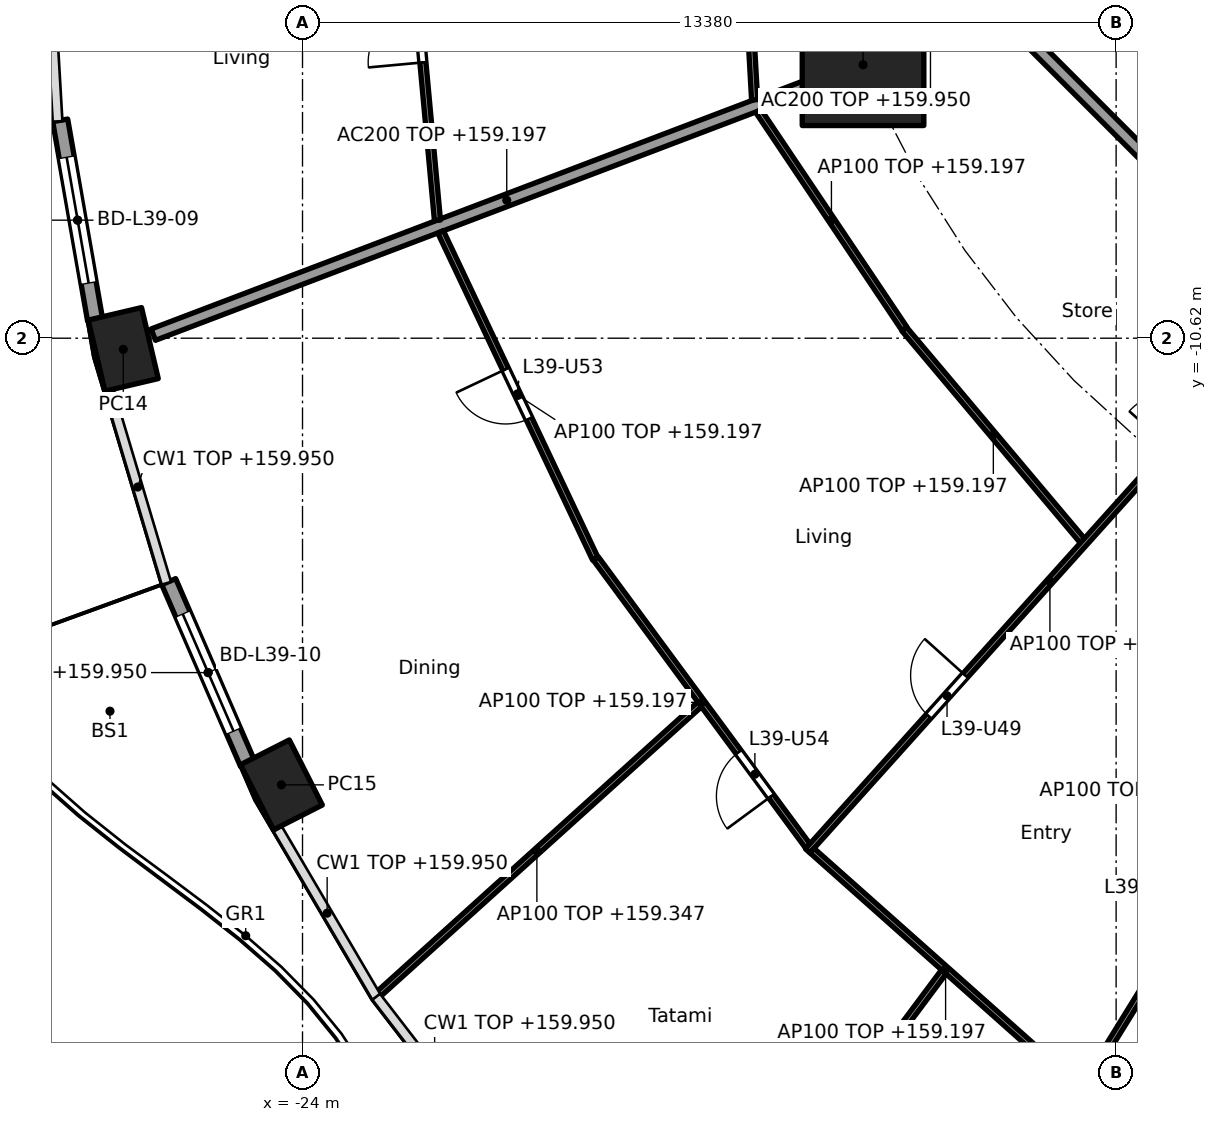
"""IFC4 building model, lengths in metres.
Left out: names, types, materials, properties, quantities, classifications, styles, units other than length and angle.
Written with IfcOpenShell. Run it as: python <this file> out.ifc"""

import sys

from ifc_helpers import new_model, si_unit, direction, frame, frame_2d, origin, origin_2d, place, context, subcontext, project, spatial, rectangle, hollow_rectangle, extrude, element, fill, save


model = new_model("IFC4")
c1 = context("Model", 3, precision=1e-05, world=origin(), true_north=direction((0.0, 1.0)))
c2 = subcontext(c1, "Body", "Model", "MODEL_VIEW")
j1 = project(units=[si_unit("LENGTHUNIT", "METRE"), si_unit("PLANEANGLEUNIT", "RADIAN")], contexts=[c1])
p1 = place(None, origin())
s1 = spatial("IfcSite", under=j1, at=p1, CompositionType="ELEMENT")
p2 = place(p1, origin())
s2 = spatial("IfcBuilding", under=s1, at=p2, CompositionType="ELEMENT")
p3 = place(p2, frame((0.0, 0.0, 156.6)))
s3 = spatial("IfcBuildingStorey", under=s2, at=p3, CompositionType="ELEMENT", Elevation=156.6)
for number, where, z_axis, x_axis in (
    (1, (-26.948, -10.803, 0.0), (0.0, 0.0, 1.0), (0.229, -0.973, 0.0)),
    (2, (-24.347, -17.965, 0.0), (0.0, 0.0, 1.0), (0.452, -0.892, 0.0)),
):
    element("IfcColumn", number, at=place(p3, frame(where, z_axis=z_axis, x_axis=x_axis)), inside=s3, PredefinedType="COLUMN", context=c2, shape_type="SweptSolid", body=[
        extrude(hollow_rectangle(XDim=1.2, YDim=0.9, WallThickness=0.04, at=origin_2d()), origin(), (0.0, 0.0, 1.0), 3.7),
    ])
p4 = place(p3, frame((-14.782, -6.123, 0.0), z_axis=(0.0, 0.0, 1.0), x_axis=(1.0, 0.0, 0.0)))
e3 = element("IfcColumn", 3, at=p4, inside=s3, PredefinedType="COLUMN", context=c2, shape_type="SweptSolid", body=[
    extrude(rectangle(XDim=2.0, YDim=2.0, at=origin_2d()), origin(), (0.0, 0.0, 1.0), 3.7),
])
p5 = place(p3, frame((-27.411, -10.32, 0.0), z_axis=(0.0, 0.0, 1.0), x_axis=(-0.172163521006, 0.985068384446, 0.0)))
e4 = element("IfcWall", 4, at=p5, inside=s3, PredefinedType="SOLIDWALL", context=c2, shape_type="SweptSolid", body=[
    extrude(rectangle(XDim=3.333, YDim=0.25, at=frame_2d((1.666, 0.0))), origin(), (0.0, 0.0, 1.0), 3.35),
])
p6 = place(p5, frame((0.616, 0.0, 0.0)))
e5 = element("IfcOpeningElement", 5, at=p6, cuts=e4, PredefinedType="OPENING", context=c2, shape_type="SweptSolid", body=[
    extrude(rectangle(XDim=2.1, YDim=2.4, at=frame_2d((1.05, 1.2))), frame((0.0, 0.135, 0.0), z_axis=(0.0, -1.0, 0.0), x_axis=(1.0, 0.0, 0.0)), (0.0, 0.0, 1.0), 0.27),
])
p7 = place(p3, frame((-24.904, -17.615, 0.0), z_axis=(0.0, 0.0, 1.0), x_axis=(-0.397638954585, 0.917541967321, 0.0)))
e6 = element("IfcWall", 6, at=p7, inside=s3, PredefinedType="SOLIDWALL", context=c2, shape_type="SweptSolid", body=[
    extrude(rectangle(XDim=3.261, YDim=0.25, at=frame_2d((1.63, 0.0))), origin(), (0.0, 0.0, 1.0), 3.35),
])
p8 = place(p7, frame((0.58, 0.0, 0.0)))
e7 = element("IfcOpeningElement", 7, at=p8, cuts=e6, PredefinedType="OPENING", context=c2, shape_type="SweptSolid", body=[
    extrude(rectangle(XDim=2.1, YDim=2.4, at=frame_2d((1.05, 1.2))), frame((0.0, 0.135, 0.0), z_axis=(0.0, -1.0, 0.0), x_axis=(1.0, 0.0, 0.0)), (0.0, 0.0, 1.0), 0.27),
])
p9 = place(p3, frame((-12.657, -5.243, 0.0), z_axis=(0.0, 0.0, 1.0), x_axis=(-0.923859888513, -0.38273085373, 0.0)))
e8 = element("IfcWall", 8, at=p9, inside=s3, PredefinedType="PARTITIONING", context=c2, shape_type="SweptSolid", body=[
    extrude(rectangle(XDim=2.199, YDim=0.2, at=frame_2d((1.1, 0.0))), origin(), (0.0, 0.0, 1.0), 3.35),
])
p10 = place(p3, frame((-14.829, -6.141, 0.0), z_axis=(0.0, 0.0, 1.0), x_axis=(-0.93470181966, -0.355432846433, 0.0)))
e9 = element("IfcWall", 9, at=p10, inside=s3, PredefinedType="PARTITIONING", context=c2, shape_type="SweptSolid", body=[
    extrude(rectangle(XDim=12.438, YDim=0.2, at=frame_2d((6.219, 0.0))), origin(), (0.0, 0.0, 1.0), 2.597),
])
p11 = place(p3, frame((-12.635, -5.134, 0.0), z_axis=(0.0, 0.0, 1.0), x_axis=(0.707106781187, -0.707106781187, 0.0)))
e10 = element("IfcWall", 10, at=p11, inside=s3, PredefinedType="PARTITIONING", context=c2, shape_type="SweptSolid", body=[
    extrude(rectangle(XDim=10.609, YDim=0.2, at=frame_2d((5.305, 0.0))), origin(), (0.0, 0.0, 1.0), 3.35),
])
p12 = place(p11, frame((8.274, 0.0, 0.0)))
e11 = element("IfcOpeningElement", 11, at=p12, cuts=e10, PredefinedType="OPENING", context=c2, shape_type="SweptSolid", body=[
    extrude(rectangle(XDim=1.0, YDim=2.1, at=frame_2d((0.5, 1.05))), frame((0.0, 0.11, 0.0), z_axis=(0.0, -1.0, 0.0), x_axis=(1.0, 0.0, 0.0)), (0.0, 0.0, 1.0), 0.22),
])
p13 = place(p3, frame((-16.825, -2.058, 0.0), z_axis=(0.0, 0.0, 1.0), x_axis=(0.055993664681, -0.998431124072, 0.0)))
e12 = element("IfcWall", 12, at=p13, inside=s3, PredefinedType="PARTITIONING", context=c2, shape_type="SweptSolid", body=[
    extrude(rectangle(XDim=4.648, YDim=0.1, at=frame_2d((2.324, 0.0))), origin(), (0.0, 0.0, 1.0), 2.597),
])
p14 = place(p13, frame((1.899, 0.0, 0.0)))
e13 = element("IfcOpeningElement", 13, at=p14, cuts=e12, PredefinedType="OPENING", context=c2, shape_type="SweptSolid", body=[
    extrude(rectangle(XDim=0.9, YDim=2.1, at=frame_2d((0.45, 1.05))), frame((0.0, 0.06, 0.0), z_axis=(0.0, -1.0, 0.0), x_axis=(1.0, 0.0, 0.0)), (0.0, 0.0, 1.0), 0.12),
])
p15 = place(p3, frame((-22.347, -2.542, 0.0), z_axis=(0.0, 0.0, 1.0), x_axis=(0.091796102484, -0.995777824401, 0.0)))
e14 = element("IfcWall", 14, at=p15, inside=s3, PredefinedType="PARTITIONING", context=c2, shape_type="SweptSolid", body=[
    extrude(rectangle(XDim=6.165, YDim=0.1, at=frame_2d((3.083, 0.0))), origin(), (0.0, 0.0, 1.0), 2.597),
])
p16 = place(p15, frame((2.657, 0.0, 0.0)))
e15 = element("IfcOpeningElement", 15, at=p16, cuts=e14, PredefinedType="OPENING", context=c2, shape_type="SweptSolid", body=[
    extrude(rectangle(XDim=0.9, YDim=2.1, at=frame_2d((0.45, 1.05))), frame((0.0, 0.06, 0.0), z_axis=(0.0, -1.0, 0.0), x_axis=(1.0, 0.0, 0.0)), (0.0, 0.0, 1.0), 0.12),
])
p17 = place(p3, frame((-16.504, -6.882, 0.0), z_axis=(0.0, 0.0, 1.0), x_axis=(0.556995256876, -0.830515673433, 0.0)))
e16 = element("IfcWall", 16, at=p17, inside=s3, PredefinedType="PARTITIONING", context=c2, shape_type="SweptSolid", body=[
    extrude(rectangle(XDim=4.317, YDim=0.1, at=frame_2d((2.158, 0.0))), origin(), (0.0, 0.0, 1.0), 2.597),
])
p18 = place(p3, frame((-21.729, -8.871, 0.0), z_axis=(0.0, 0.0, 1.0), x_axis=(0.427721126152, -0.903910746834, 0.0)))
e17 = element("IfcWall", 17, at=p18, inside=s3, PredefinedType="PARTITIONING", context=c2, shape_type="SweptSolid", body=[
    extrude(rectangle(XDim=5.949, YDim=0.1, at=frame_2d((2.974, 0.0))), origin(), (0.0, 0.0, 1.0), 2.597),
])
p19 = place(p18, frame((2.5, 0.0, 0.0)))
e18 = element("IfcOpeningElement", 18, at=p19, cuts=e17, PredefinedType="OPENING", context=c2, shape_type="SweptSolid", body=[
    extrude(rectangle(XDim=0.9, YDim=2.1, at=frame_2d((0.45, 1.05))), frame((0.0, 0.06, 0.0), z_axis=(0.0, -1.0, 0.0), x_axis=(1.0, 0.0, 0.0)), (0.0, 0.0, 1.0), 0.12),
])
p20 = place(p3, frame((-14.104, -10.47, 0.0), z_axis=(0.0, 0.0, 1.0), x_axis=(0.644051444483, -0.764982180746, 0.0)))
e19 = element("IfcWall", 19, at=p20, inside=s3, PredefinedType="PARTITIONING", context=c2, shape_type="SweptSolid", body=[
    extrude(rectangle(XDim=4.548, YDim=0.1, at=frame_2d((2.274, 0.0))), origin(), (0.0, 0.0, 1.0), 2.597),
])
p21 = place(p3, frame((-19.176, -14.244, 0.0), z_axis=(0.0, 0.0, 1.0), x_axis=(0.593532053206, -0.80481035146, 0.0)))
e20 = element("IfcWall", 20, at=p21, inside=s3, PredefinedType="PARTITIONING", context=c2, shape_type="SweptSolid", body=[
    extrude(rectangle(XDim=5.876, YDim=0.1, at=frame_2d((2.938, 0.0))), origin(), (0.0, 0.0, 1.0), 2.597),
])
p22 = place(p21, frame((3.957, 0.0, 0.0)))
e21 = element("IfcOpeningElement", 21, at=p22, cuts=e20, PredefinedType="OPENING", context=c2, shape_type="SweptSolid", body=[
    extrude(rectangle(XDim=0.9, YDim=2.1, at=frame_2d((0.45, 1.05))), frame((0.0, 0.06, 0.0), z_axis=(0.0, -1.0, 0.0), x_axis=(1.0, 0.0, 0.0)), (0.0, 0.0, 1.0), 0.12),
])
p23 = place(p3, frame((-17.47, -16.642, 0.0), z_axis=(0.0, 0.0, 1.0), x_axis=(-0.742345465337, -0.670017320742, 0.0)))
e22 = element("IfcWall", 22, at=p23, inside=s3, PredefinedType="PARTITIONING", context=c2, shape_type="SweptSolid", body=[
    extrude(rectangle(XDim=7.21, YDim=0.1, at=frame_2d((3.605, 0.0))), origin(), (0.0, 0.0, 1.0), 2.747),
])
p24 = place(p3, frame((-7.725, -10.186, 0.0), z_axis=(0.0, 0.0, 1.0), x_axis=(-0.668498346565, -0.743713628112, 0.0)))
e23 = element("IfcWall", 23, at=p24, inside=s3, PredefinedType="PARTITIONING", context=c2, shape_type="SweptSolid", body=[
    extrude(rectangle(XDim=11.919, YDim=0.1, at=frame_2d((5.959, 0.0))), origin(), (0.0, 0.0, 1.0), 2.515),
])
p25 = place(p24, frame((2.106, 0.0, 0.0)))
e24 = element("IfcOpeningElement", 24, at=p25, cuts=e23, PredefinedType="OPENING", context=c2, shape_type="SweptSolid", body=[
    extrude(rectangle(XDim=0.9, YDim=2.1, at=frame_2d((0.45, 1.05))), frame((0.0, 0.06, 0.0), z_axis=(0.0, -1.0, 0.0), x_axis=(1.0, 0.0, 0.0)), (0.0, 0.0, 1.0), 0.12),
])
p26 = place(p24, frame((8.041, 0.0, 0.0)))
e25 = element("IfcOpeningElement", 25, at=p26, cuts=e23, PredefinedType="OPENING", context=c2, shape_type="SweptSolid", body=[
    extrude(rectangle(XDim=0.9, YDim=2.1, at=frame_2d((0.45, 1.05))), frame((0.0, 0.06, 0.0), z_axis=(0.0, -1.0, 0.0), x_axis=(1.0, 0.0, 0.0)), (0.0, 0.0, 1.0), 0.12),
])
p27 = place(p3, frame((-15.622, -19.046, 0.0), z_axis=(0.0, 0.0, 1.0), x_axis=(0.747342891849, -0.664438561496, 0.0)))
e26 = element("IfcWall", 26, at=p27, inside=s3, PredefinedType="PARTITIONING", context=c2, shape_type="SweptSolid", body=[
    extrude(rectangle(XDim=5.881, YDim=0.1, at=frame_2d((2.94, 0.0))), origin(), (0.0, 0.0, 1.0), 2.597),
])
p28 = place(p3, frame((-13.454, -21.04, 0.0), z_axis=(0.0, 0.0, 1.0), x_axis=(-0.597848033124, -0.801609461826, 0.0)))
e27 = element("IfcWall", 27, at=p28, inside=s3, PredefinedType="PARTITIONING", context=c2, shape_type="SweptSolid", body=[
    extrude(rectangle(XDim=7.486, YDim=0.1, at=frame_2d((3.743, 0.0))), origin(), (0.0, 0.0, 1.0), 2.747),
])
p29 = place(p28, frame((3.293, 0.0, 0.0)))
e28 = element("IfcOpeningElement", 28, at=p29, cuts=e27, PredefinedType="OPENING", context=c2, shape_type="SweptSolid", body=[
    extrude(rectangle(XDim=0.9, YDim=2.1, at=frame_2d((0.45, 1.05))), frame((0.0, 0.06, 0.0), z_axis=(0.0, -1.0, 0.0), x_axis=(1.0, 0.0, 0.0)), (0.0, 0.0, 1.0), 0.12),
])
p30 = place(p3, frame((-6.149, -14.825, 0.0), z_axis=(0.0, 0.0, 1.0), x_axis=(-0.525396393596, -0.850857584791, 0.0)))
e29 = element("IfcWall", 29, at=p30, inside=s3, PredefinedType="PARTITIONING", context=c2, shape_type="SweptSolid", body=[
    extrude(rectangle(XDim=9.643, YDim=0.1, at=frame_2d((4.822, 0.0))), origin(), (0.0, 0.0, 1.0), 3.35),
])
p31 = place(p30, frame((1.485, 0.0, 0.0)))
e30 = element("IfcOpeningElement", 30, at=p31, cuts=e29, PredefinedType="OPENING", context=c2, shape_type="SweptSolid", body=[
    extrude(rectangle(XDim=0.9, YDim=2.1, at=frame_2d((0.45, 1.05))), frame((0.0, 0.06, 0.0), z_axis=(0.0, -1.0, 0.0), x_axis=(1.0, 0.0, 0.0)), (0.0, 0.0, 1.0), 0.12),
])
p32 = place(p30, frame((5.744, 0.0, 0.0)))
e31 = element("IfcOpeningElement", 31, at=p32, cuts=e29, PredefinedType="OPENING", context=c2, shape_type="SweptSolid", body=[
    extrude(rectangle(XDim=0.9, YDim=2.1, at=frame_2d((0.45, 1.05))), frame((0.0, 0.06, 0.0), z_axis=(0.0, -1.0, 0.0), x_axis=(1.0, 0.0, 0.0)), (0.0, 0.0, 1.0), 0.12),
])
p33 = place(p3, frame((-5.949, -17.591, 0.0), z_axis=(0.0, 0.0, 1.0), x_axis=(-0.40838467696, -0.912809923053, 0.0)))
e32 = element("IfcWall", 32, at=p33, inside=s3, PredefinedType="PARTITIONING", context=c2, shape_type="SweptSolid", body=[
    extrude(rectangle(XDim=14.665, YDim=0.1, at=frame_2d((7.333, 0.0))), origin(), (0.0, 0.0, 1.0), 2.747),
])
p34 = place(p6, origin())
e33 = element("IfcDoor", 33, at=p34, inside=s3, OperationType="SLIDING_TO_LEFT", PredefinedType="DOOR", context=c2, shape_type="SweptSolid", body=[
    extrude(rectangle(XDim=2.1, YDim=2.4, at=frame_2d((1.05, 1.2))), frame((0.0, 0.025, 0.0), z_axis=(0.0, -1.0, 0.0), x_axis=(1.0, 0.0, 0.0)), (0.0, 0.0, 1.0), 0.05),
])
fill(e5, e33)
p35 = place(p8, origin())
e34 = element("IfcDoor", 34, at=p35, inside=s3, OperationType="SLIDING_TO_LEFT", PredefinedType="DOOR", context=c2, shape_type="SweptSolid", body=[
    extrude(rectangle(XDim=2.1, YDim=2.4, at=frame_2d((1.05, 1.2))), frame((0.0, 0.025, 0.0), z_axis=(0.0, -1.0, 0.0), x_axis=(1.0, 0.0, 0.0)), (0.0, 0.0, 1.0), 0.05),
])
fill(e7, e34)
p36 = place(p16, frame((0.9, 0.0, 0.0), x_axis=(-1.0, 0.0, 0.0)))
e35 = element("IfcDoor", 35, at=p36, inside=s3, OperationType="SINGLE_SWING_LEFT", PredefinedType="DOOR", context=c2, shape_type="SweptSolid", body=[
    extrude(rectangle(XDim=0.9, YDim=2.1, at=frame_2d((0.45, 1.05))), frame((0.0, 0.025, 0.0), z_axis=(0.0, -1.0, 0.0), x_axis=(1.0, 0.0, 0.0)), (0.0, 0.0, 1.0), 0.05),
])
fill(e15, e35)
p37 = place(p26, frame((0.9, 0.0, 0.0), x_axis=(-1.0, 0.0, 0.0)))
e36 = element("IfcDoor", 36, at=p37, inside=s3, OperationType="SINGLE_SWING_RIGHT", PredefinedType="DOOR", context=c2, shape_type="SweptSolid", body=[
    extrude(rectangle(XDim=0.9, YDim=2.1, at=frame_2d((0.45, 1.05))), frame((0.0, 0.025, 0.0), z_axis=(0.0, -1.0, 0.0), x_axis=(1.0, 0.0, 0.0)), (0.0, 0.0, 1.0), 0.05),
])
fill(e25, e36)
p38 = place(p19, frame((0.9, 0.0, 0.0), x_axis=(-1.0, 0.0, 0.0)))
e37 = element("IfcDoor", 37, at=p38, inside=s3, OperationType="SINGLE_SWING_RIGHT", PredefinedType="DOOR", context=c2, shape_type="SweptSolid", body=[
    extrude(rectangle(XDim=0.9, YDim=2.1, at=frame_2d((0.45, 1.05))), frame((0.0, 0.025, 0.0), z_axis=(0.0, -1.0, 0.0), x_axis=(1.0, 0.0, 0.0)), (0.0, 0.0, 1.0), 0.05),
])
fill(e18, e37)
p39 = place(p22, frame((0.9, 0.0, 0.0), x_axis=(-1.0, 0.0, 0.0)))
e38 = element("IfcDoor", 38, at=p39, inside=s3, OperationType="SINGLE_SWING_LEFT", PredefinedType="DOOR", context=c2, shape_type="SweptSolid", body=[
    extrude(rectangle(XDim=0.9, YDim=2.1, at=frame_2d((0.45, 1.05))), frame((0.0, 0.025, 0.0), z_axis=(0.0, -1.0, 0.0), x_axis=(1.0, 0.0, 0.0)), (0.0, 0.0, 1.0), 0.05),
])
fill(e21, e38)
save(model, sys.argv[1])
